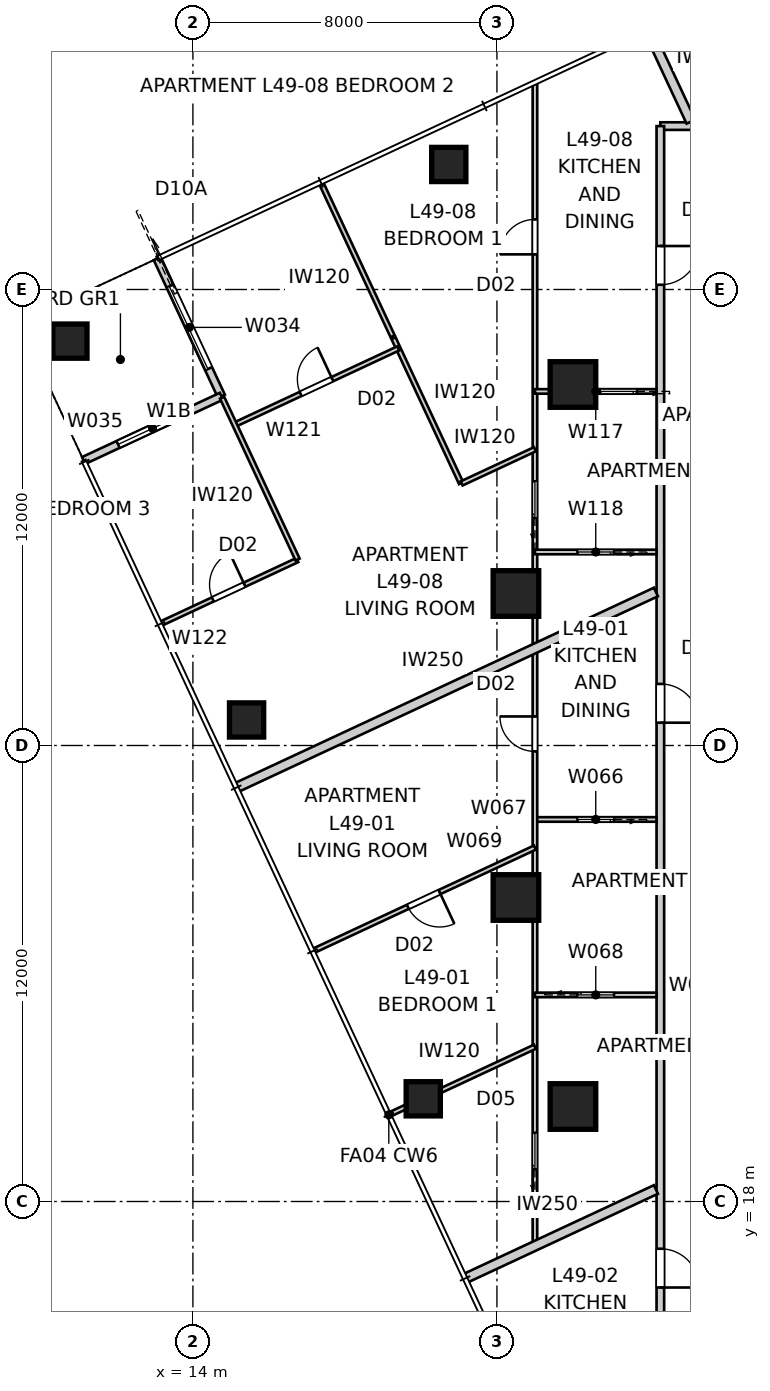
"""IFC4 building model, lengths in metres.
Left out: names, types, materials, properties, quantities, classifications, styles, units other than length and angle.
Written with IfcOpenShell. Run it as: python <this file> out.ifc"""

import sys

from ifc_helpers import new_model, si_unit, direction, frame, frame_2d, origin, origin_2d, place, context, subcontext, project, spatial, rectangle, extrude, element, fill, save


model = new_model("IFC4")
c1 = context("Model", 3, precision=1e-05, world=origin(), true_north=direction((0.0, 1.0)))
c2 = subcontext(c1, "Body", "Model", "MODEL_VIEW")
j1 = project(units=[si_unit("LENGTHUNIT", "METRE"), si_unit("PLANEANGLEUNIT", "RADIAN")], contexts=[c1])
p1 = place(None, origin())
s1 = spatial("IfcSite", under=j1, at=p1, CompositionType="ELEMENT")
p2 = place(p1, origin())
s2 = spatial("IfcBuilding", under=s1, at=p2, CompositionType="ELEMENT")
p3 = place(p2, frame((0.0, 0.0, 179.4)))
s3 = spatial("IfcBuildingStorey", under=s2, at=p3, CompositionType="ELEMENT", Elevation=179.4)
for number, where, z_axis, x_axis in (
    (1, (20.733, 45.29, 0.0), (0.0, 0.0, 1.0), (1.0, 0.0, 0.0)),
    (2, (10.764, 40.641, 0.0), (0.0, 0.0, 1.0), (1.0, 0.0, 0.0)),
    (3, (15.412, 30.672, 0.0), (0.0, 0.0, 1.0), (1.0, 0.0, 0.0)),
    (4, (20.061, 20.702, 0.0), (0.0, 0.0, 1.0), (1.0, 0.0, 0.0)),
):
    element("IfcColumn", number, at=place(p3, frame(where, z_axis=z_axis, x_axis=x_axis)), inside=s3, PredefinedType="COLUMN", context=c2, shape_type="SweptSolid", body=[
        extrude(rectangle(XDim=0.9, YDim=0.9, at=origin_2d()), origin(), (0.0, 0.0, 1.0), 3.4),
    ])
for number, where, z_axis, x_axis in (
    (5, (24.0, 39.5, 0.0), (0.0, 0.0, 1.0), (1.0, 0.0, 0.0)),
    (6, (22.5, 34.0, 0.0), (0.0, 0.0, 1.0), (1.0, 0.0, 0.0)),
    (7, (22.5, 26.0, 0.0), (0.0, 0.0, 1.0), (1.0, 0.0, 0.0)),
    (8, (24.0, 20.5, 0.0), (0.0, 0.0, 1.0), (1.0, 0.0, 0.0)),
):
    element("IfcColumn", number, at=place(p3, frame(where, z_axis=z_axis, x_axis=x_axis)), inside=s3, PredefinedType="COLUMN", context=c2, shape_type="SweptSolid", body=[
        extrude(rectangle(XDim=1.2, YDim=1.2, at=origin_2d()), origin(), (0.0, 0.0, 1.0), 3.4),
    ])
p4 = place(p3, frame((13.06, 42.815, 0.0), z_axis=(0.0, 0.0, 1.0), x_axis=(0.422658246362, -0.906289140828, 0.0)))
e9 = element("IfcWall", 9, at=p4, inside=s3, PredefinedType="SOLIDWALL", context=c2, shape_type="SweptSolid", body=[
    extrude(rectangle(XDim=4.0, YDim=0.2, at=frame_2d((2.0, 0.0))), origin(), (0.0, 0.0, 1.0), 3.25),
])
p5 = place(p4, frame((0.8, 0.0, 0.0)))
e10 = element("IfcOpeningElement", 10, at=p5, cuts=e9, PredefinedType="OPENING", context=c2, shape_type="SweptSolid", body=[
    extrude(rectangle(XDim=2.4, YDim=2.1, at=frame_2d((1.2, 1.05))), frame((0.0, 0.11, 0.0), z_axis=(0.0, -1.0, 0.0), x_axis=(1.0, 0.0, 0.0)), (0.0, 0.0, 1.0), 0.22),
])
p6 = place(p3, frame((14.75, 39.19, 0.0), z_axis=(0.0, 0.0, 1.0), x_axis=(-0.906289140828, -0.422658246362, 0.0)))
e11 = element("IfcWall", 11, at=p6, inside=s3, PredefinedType="SOLIDWALL", context=c2, shape_type="SweptSolid", body=[
    extrude(rectangle(XDim=4.0, YDim=0.2, at=frame_2d((2.0, 0.0))), origin(), (0.0, 0.0, 1.0), 3.25),
])
p7 = place(p6, frame((1.0, 0.0, 0.45)))
e12 = element("IfcOpeningElement", 12, at=p7, cuts=e11, PredefinedType="OPENING", context=c2, shape_type="SweptSolid", body=[
    extrude(rectangle(XDim=2.0, YDim=1.8, at=frame_2d((1.0, 0.9))), frame((0.0, 0.11, 0.0), z_axis=(0.0, -1.0, 0.0), x_axis=(1.0, 0.0, 0.0)), (0.0, 0.0, 1.0), 0.22),
])
p8 = place(p3, frame((30.758, 46.3, 0.0), z_axis=(0.0, 0.0, 1.0), x_axis=(-1.0, 0.0, 0.0)))
e13 = element("IfcWall", 13, at=p8, inside=s3, PredefinedType="PARTITIONING", context=c2, shape_type="SweptSolid", body=[
    extrude(rectangle(XDim=4.458, YDim=0.2, at=frame_2d((2.229, 0.0))), origin(), (0.0, 0.0, 1.0), 3.25),
])
p9 = place(p3, frame((26.3, 46.3, 0.0), z_axis=(0.0, 0.0, 1.0), x_axis=(0.0, -1.0, 0.0)))
e14 = element("IfcWall", 14, at=p9, inside=s3, PredefinedType="PARTITIONING", context=c2, shape_type="SweptSolid", body=[
    extrude(rectangle(XDim=32.6, YDim=0.2, at=frame_2d((16.3, 0.0))), origin(), (0.0, 0.0, 1.0), 3.25),
])
p10 = place(p9, frame((3.156, 0.0, 0.0)))
e15 = element("IfcOpeningElement", 15, at=p10, cuts=e14, PredefinedType="OPENING", context=c2, shape_type="SweptSolid", body=[
    extrude(rectangle(XDim=1.02, YDim=2.1, at=frame_2d((0.51, 1.05))), frame((0.0, 0.11, 0.0), z_axis=(0.0, -1.0, 0.0), x_axis=(1.0, 0.0, 0.0)), (0.0, 0.0, 1.0), 0.22),
])
p11 = place(p9, frame((14.68, 0.0, 0.0)))
e16 = element("IfcOpeningElement", 16, at=p11, cuts=e14, PredefinedType="OPENING", context=c2, shape_type="SweptSolid", body=[
    extrude(rectangle(XDim=1.02, YDim=2.34, at=frame_2d((0.51, 1.17))), frame((0.0, 0.11, 0.0), z_axis=(0.0, -1.0, 0.0), x_axis=(1.0, 0.0, 0.0)), (0.0, 0.0, 1.0), 0.22),
])
p12 = place(p9, frame((29.543, 0.0, 0.0)))
e17 = element("IfcOpeningElement", 17, at=p12, cuts=e14, PredefinedType="OPENING", context=c2, shape_type="SweptSolid", body=[
    extrude(rectangle(XDim=1.02, YDim=2.34, at=frame_2d((0.51, 1.17))), frame((0.0, 0.11, 0.0), z_axis=(0.0, -1.0, 0.0), x_axis=(1.0, 0.0, 0.0)), (0.0, 0.0, 1.0), 0.22),
])
p13 = place(p3, frame((25.975, 48.838, 0.0), z_axis=(0.0, 0.0, 1.0), x_axis=(0.422590257842, -0.906320844943, 0.0)))
e18 = element("IfcWall", 18, at=p13, inside=s3, PredefinedType="PARTITIONING", context=c2, shape_type="SweptSolid", body=[
    extrude(rectangle(XDim=2.671, YDim=0.25, at=frame_2d((1.336, 0.0))), origin(), (0.0, 0.0, 1.0), 3.25),
])
p14 = place(p3, frame((15.14, 28.89, 0.0), z_axis=(0.0, 0.0, 1.0), x_axis=(0.906303906082, 0.422626584374, 0.0)))
e19 = element("IfcWall", 19, at=p14, inside=s3, PredefinedType="PARTITIONING", context=c2, shape_type="SweptSolid", body=[
    extrude(rectangle(XDim=12.185, YDim=0.25, at=frame_2d((6.092, 0.0))), origin(), (0.0, 0.0, 1.0), 3.25),
])
p15 = place(p3, frame((21.162, 15.975, 0.0), z_axis=(0.0, 0.0, 1.0), x_axis=(0.906309193024, 0.422615246577, 0.0)))
e20 = element("IfcWall", 20, at=p15, inside=s3, PredefinedType="PARTITIONING", context=c2, shape_type="SweptSolid", body=[
    extrude(rectangle(XDim=5.54, YDim=0.25, at=frame_2d((2.77, 0.0))), origin(), (0.0, 0.0, 1.0), 3.25),
])
p16 = place(p3, frame((26.2, 28.054, 0.0), z_axis=(0.0, 0.0, 1.0), x_axis=(-1.0, 0.0, 0.0)))
e21 = element("IfcWall", 21, at=p16, inside=s3, PredefinedType="PARTITIONING", context=c2, shape_type="SweptSolid", body=[
    extrude(rectangle(XDim=3.2, YDim=0.12, at=frame_2d((1.6, 0.0))), origin(), (0.0, 0.0, 1.0), 3.25),
])
p17 = place(p16, frame((1.12, 0.0, 0.0)))
e22 = element("IfcOpeningElement", 22, at=p17, cuts=e21, PredefinedType="OPENING", context=c2, shape_type="SweptSolid", body=[
    extrude(rectangle(XDim=0.96, YDim=2.1, at=frame_2d((0.48, 1.05))), frame((0.0, 0.07, 0.0), z_axis=(0.0, -1.0, 0.0), x_axis=(1.0, 0.0, 0.0)), (0.0, 0.0, 1.0), 0.14),
])
p18 = place(p3, frame((23.0, 16.832, 0.0), z_axis=(0.0, 0.0, 1.0), x_axis=(0.0, 1.0, 0.0)))
e23 = element("IfcWall", 23, at=p18, inside=s3, PredefinedType="PARTITIONING", context=c2, shape_type="SweptSolid", body=[
    extrude(rectangle(XDim=30.574, YDim=0.12, at=frame_2d((15.287, 0.0))), origin(), (0.0, 0.0, 1.0), 2.55),
])
p19 = place(p18, frame((26.093, 0.0, 0.0)))
e24 = element("IfcOpeningElement", 24, at=p19, cuts=e23, PredefinedType="OPENING", context=c2, shape_type="SweptSolid", body=[
    extrude(rectangle(XDim=0.92, YDim=2.34, at=frame_2d((0.46, 1.17))), frame((0.0, 0.07, 0.0), z_axis=(0.0, -1.0, 0.0), x_axis=(1.0, 0.0, 0.0)), (0.0, 0.0, 1.0), 0.14),
])
p20 = place(p18, frame((13.012, 0.0, 0.0)))
e25 = element("IfcOpeningElement", 25, at=p20, cuts=e23, PredefinedType="OPENING", context=c2, shape_type="SweptSolid", body=[
    extrude(rectangle(XDim=0.92, YDim=2.34, at=frame_2d((0.46, 1.17))), frame((0.0, 0.07, 0.0), z_axis=(0.0, -1.0, 0.0), x_axis=(1.0, 0.0, 0.0)), (0.0, 0.0, 1.0), 0.14),
])
p21 = place(p18, frame((19.16, 0.0, 0.0)))
e26 = element("IfcOpeningElement", 26, at=p21, cuts=e23, PredefinedType="OPENING", context=c2, shape_type="SweptSolid", body=[
    extrude(rectangle(XDim=0.96, YDim=2.1, at=frame_2d((0.48, 1.05))), frame((0.0, 0.07, 0.0), z_axis=(0.0, -1.0, 0.0), x_axis=(1.0, 0.0, 0.0)), (0.0, 0.0, 1.0), 0.14),
])
p22 = place(p18, frame((2.018, 0.0, 0.0)))
e27 = element("IfcOpeningElement", 27, at=p22, cuts=e23, PredefinedType="OPENING", context=c2, shape_type="SweptSolid", body=[
    extrude(rectangle(XDim=0.96, YDim=2.1, at=frame_2d((0.48, 1.05))), frame((0.0, 0.07, 0.0), z_axis=(0.0, -1.0, 0.0), x_axis=(1.0, 0.0, 0.0)), (0.0, 0.0, 1.0), 0.14),
])
p23 = place(p3, frame((23.0, 23.436, 0.0), z_axis=(0.0, 0.0, 1.0), x_axis=(1.0, 0.0, 0.0)))
e28 = element("IfcWall", 28, at=p23, inside=s3, PredefinedType="PARTITIONING", context=c2, shape_type="SweptSolid", body=[
    extrude(rectangle(XDim=3.2, YDim=0.12, at=frame_2d((1.6, 0.0))), origin(), (0.0, 0.0, 1.0), 3.25),
])
p24 = place(p23, frame((1.12, 0.0, 0.0)))
e29 = element("IfcOpeningElement", 29, at=p24, cuts=e28, PredefinedType="OPENING", context=c2, shape_type="SweptSolid", body=[
    extrude(rectangle(XDim=0.96, YDim=2.1, at=frame_2d((0.48, 1.05))), frame((0.0, 0.07, 0.0), z_axis=(0.0, -1.0, 0.0), x_axis=(1.0, 0.0, 0.0)), (0.0, 0.0, 1.0), 0.14),
])
p25 = place(p3, frame((23.0, 27.314, 0.0), z_axis=(0.0, 0.0, 1.0), x_axis=(-0.906305562553, -0.422623032129, 0.0)))
e30 = element("IfcWall", 30, at=p25, inside=s3, PredefinedType="PARTITIONING", context=c2, shape_type="SweptSolid", body=[
    extrude(rectangle(XDim=6.417, YDim=0.12, at=frame_2d((3.209, 0.0))), origin(), (0.0, 0.0, 1.0), 3.25),
])
p26 = place(p25, frame((2.769, 0.0, 0.0)))
e31 = element("IfcOpeningElement", 31, at=p26, cuts=e30, PredefinedType="OPENING", context=c2, shape_type="SweptSolid", body=[
    extrude(rectangle(XDim=0.92, YDim=2.34, at=frame_2d((0.46, 1.17))), frame((0.0, 0.07, 0.0), z_axis=(0.0, -1.0, 0.0), x_axis=(1.0, 0.0, 0.0)), (0.0, 0.0, 1.0), 0.14),
])
p27 = place(p3, frame((23.0, 22.073, 0.0), z_axis=(0.0, 0.0, 1.0), x_axis=(-0.906304800396, -0.422624666552, 0.0)))
e32 = element("IfcWall", 32, at=p27, inside=s3, PredefinedType="PARTITIONING", context=c2, shape_type="SweptSolid", body=[
    extrude(rectangle(XDim=4.203, YDim=0.12, at=frame_2d((2.101, 0.0))), origin(), (0.0, 0.0, 1.0), 3.25),
])
p28 = place(p3, frame((26.2, 39.318, 0.0), z_axis=(0.0, 0.0, 1.0), x_axis=(-1.0, 0.0, 0.0)))
e33 = element("IfcWall", 33, at=p28, inside=s3, PredefinedType="PARTITIONING", context=c2, shape_type="SweptSolid", body=[
    extrude(rectangle(XDim=3.2, YDim=0.12, at=frame_2d((1.6, 0.0))), origin(), (0.0, 0.0, 1.0), 3.25),
])
p29 = place(p28, frame((0.52, 0.0, 0.0)))
e34 = element("IfcOpeningElement", 34, at=p29, cuts=e33, PredefinedType="OPENING", context=c2, shape_type="SweptSolid", body=[
    extrude(rectangle(XDim=0.96, YDim=2.1, at=frame_2d((0.48, 1.05))), frame((0.0, 0.07, 0.0), z_axis=(0.0, -1.0, 0.0), x_axis=(1.0, 0.0, 0.0)), (0.0, 0.0, 1.0), 0.14),
])
p30 = place(p3, frame((26.2, 35.092, 0.0), z_axis=(0.0, 0.0, 1.0), x_axis=(-1.0, 0.0, 0.0)))
e35 = element("IfcWall", 35, at=p30, inside=s3, PredefinedType="PARTITIONING", context=c2, shape_type="SweptSolid", body=[
    extrude(rectangle(XDim=3.2, YDim=0.12, at=frame_2d((1.6, 0.0))), origin(), (0.0, 0.0, 1.0), 3.25),
])
p31 = place(p30, frame((1.12, 0.0, 0.0)))
e36 = element("IfcOpeningElement", 36, at=p31, cuts=e35, PredefinedType="OPENING", context=c2, shape_type="SweptSolid", body=[
    extrude(rectangle(XDim=0.96, YDim=2.1, at=frame_2d((0.48, 1.05))), frame((0.0, 0.07, 0.0), z_axis=(0.0, -1.0, 0.0), x_axis=(1.0, 0.0, 0.0)), (0.0, 0.0, 1.0), 0.14),
])
p32 = place(p3, frame((19.279, 40.718, 0.0), z_axis=(0.0, 0.0, 1.0), x_axis=(0.422625167194, -0.906304566939, 0.0)))
e37 = element("IfcWall", 37, at=p32, inside=s3, PredefinedType="PARTITIONING", context=c2, shape_type="SweptSolid", body=[
    extrude(rectangle(XDim=4.211, YDim=0.12, at=frame_2d((2.105, 0.0))), origin(), (0.0, 0.0, 1.0), 3.25),
])
p33 = place(p3, frame((21.072, 36.897, 0.0), z_axis=(0.0, 0.0, 1.0), x_axis=(0.90630329877, 0.422627886727, 0.0)))
e38 = element("IfcWall", 38, at=p33, inside=s3, PredefinedType="PARTITIONING", context=c2, shape_type="SweptSolid", body=[
    extrude(rectangle(XDim=2.128, YDim=0.12, at=frame_2d((1.064, 0.0))), origin(), (0.0, 0.0, 1.0), 3.25),
])
p34 = place(p3, frame((15.099, 38.442, 0.0), z_axis=(0.0, 0.0, 1.0), x_axis=(0.906306539388, 0.422620937321, 0.0)))
e39 = element("IfcWall", 39, at=p34, inside=s3, PredefinedType="PARTITIONING", context=c2, shape_type="SweptSolid", body=[
    extrude(rectangle(XDim=4.75, YDim=0.12, at=frame_2d((2.375, 0.0))), origin(), (0.0, 0.0, 1.0), 3.25),
])
p35 = place(p34, frame((1.915, 0.0, 0.0)))
e40 = element("IfcOpeningElement", 40, at=p35, cuts=e39, PredefinedType="OPENING", context=c2, shape_type="SweptSolid", body=[
    extrude(rectangle(XDim=0.92, YDim=2.34, at=frame_2d((0.46, 1.17))), frame((0.0, 0.07, 0.0), z_axis=(0.0, -1.0, 0.0), x_axis=(1.0, 0.0, 0.0)), (0.0, 0.0, 1.0), 0.14),
])
p36 = place(p3, frame((13.169, 33.211, 0.0), z_axis=(0.0, 0.0, 1.0), x_axis=(0.9062952203, 0.422645210149, 0.0)))
e41 = element("IfcWall", 41, at=p36, inside=s3, PredefinedType="PARTITIONING", context=c2, shape_type="SweptSolid", body=[
    extrude(rectangle(XDim=3.95, YDim=0.12, at=frame_2d((1.975, 0.0))), origin(), (0.0, 0.0, 1.0), 3.25),
])
p37 = place(p36, frame((1.495, 0.0, 0.0)))
e42 = element("IfcOpeningElement", 42, at=p37, cuts=e41, PredefinedType="OPENING", context=c2, shape_type="SweptSolid", body=[
    extrude(rectangle(XDim=0.92, YDim=2.34, at=frame_2d((0.46, 1.17))), frame((0.0, 0.07, 0.0), z_axis=(0.0, -1.0, 0.0), x_axis=(1.0, 0.0, 0.0)), (0.0, 0.0, 1.0), 0.14),
])
p38 = place(p3, frame((16.754, 34.894, 0.0), z_axis=(0.0, 0.0, 1.0), x_axis=(-0.42256979057, 0.906330387937, 0.0)))
e43 = element("IfcWall", 43, at=p38, inside=s3, PredefinedType="PARTITIONING", context=c2, shape_type="SweptSolid", body=[
    extrude(rectangle(XDim=4.7, YDim=0.12, at=frame_2d((2.35, 0.0))), origin(), (0.0, 0.0, 1.0), 3.25),
])
p39 = place(p3, frame((19.256, 40.767, 0.0), z_axis=(0.0, 0.0, 1.0), x_axis=(-0.42260518136, 0.906313886403, 0.0)))
e44 = element("IfcWall", 44, at=p39, inside=s3, PredefinedType="PARTITIONING", context=c2, shape_type="SweptSolid", body=[
    extrude(rectangle(XDim=4.435, YDim=0.12, at=frame_2d((2.218, 0.0))), origin(), (0.0, 0.0, 1.0), 3.25),
])
p40 = place(p5, origin())
e45 = element("IfcDoor", 45, at=p40, inside=s3, OperationType="SLIDING_TO_LEFT", PredefinedType="DOOR", context=c2, shape_type="SweptSolid", body=[
    extrude(rectangle(XDim=2.4, YDim=2.1, at=frame_2d((1.2, 1.05))), frame((0.0, 0.025, 0.0), z_axis=(0.0, -1.0, 0.0), x_axis=(1.0, 0.0, 0.0)), (0.0, 0.0, 1.0), 0.05),
])
fill(e10, e45)
p41 = place(p7, origin())
e46 = element("IfcWindow", 46, at=p41, inside=s3, PartitioningType="SINGLE_PANEL", PredefinedType="WINDOW", context=c2, shape_type="SweptSolid", body=[
    extrude(rectangle(XDim=2.0, YDim=1.8, at=frame_2d((1.0, 0.9))), frame((0.0, 0.03, 0.0), z_axis=(0.0, -1.0, 0.0), x_axis=(1.0, 0.0, 0.0)), (0.0, 0.0, 1.0), 0.06),
])
fill(e12, e46)
p42 = place(p10, origin())
e47 = element("IfcDoor", 47, at=p42, inside=s3, OperationType="SINGLE_SWING_LEFT", PredefinedType="DOOR", context=c2, shape_type="SweptSolid", body=[
    extrude(rectangle(XDim=1.02, YDim=2.1, at=frame_2d((0.51, 1.05))), frame((0.0, 0.025, 0.0), z_axis=(0.0, -1.0, 0.0), x_axis=(1.0, 0.0, 0.0)), (0.0, 0.0, 1.0), 0.05),
])
fill(e15, e47)
p43 = place(p11, origin())
e48 = element("IfcDoor", 48, at=p43, inside=s3, OperationType="SINGLE_SWING_RIGHT", PredefinedType="DOOR", context=c2, shape_type="SweptSolid", body=[
    extrude(rectangle(XDim=1.02, YDim=2.34, at=frame_2d((0.51, 1.17))), frame((0.0, 0.025, 0.0), z_axis=(0.0, -1.0, 0.0), x_axis=(1.0, 0.0, 0.0)), (0.0, 0.0, 1.0), 0.05),
])
fill(e16, e48)
p44 = place(p12, origin())
e49 = element("IfcDoor", 49, at=p44, inside=s3, OperationType="SINGLE_SWING_RIGHT", PredefinedType="DOOR", context=c2, shape_type="SweptSolid", body=[
    extrude(rectangle(XDim=1.02, YDim=2.34, at=frame_2d((0.51, 1.17))), frame((0.0, 0.025, 0.0), z_axis=(0.0, -1.0, 0.0), x_axis=(1.0, 0.0, 0.0)), (0.0, 0.0, 1.0), 0.05),
])
fill(e17, e49)
p45 = place(p19, origin())
e50 = element("IfcDoor", 50, at=p45, inside=s3, OperationType="SINGLE_SWING_LEFT", PredefinedType="DOOR", context=c2, shape_type="SweptSolid", body=[
    extrude(rectangle(XDim=0.92, YDim=2.34, at=frame_2d((0.46, 1.17))), frame((0.0, 0.025, 0.0), z_axis=(0.0, -1.0, 0.0), x_axis=(1.0, 0.0, 0.0)), (0.0, 0.0, 1.0), 0.05),
])
fill(e24, e50)
p46 = place(p29, origin())
e51 = element("IfcDoor", 51, at=p46, inside=s3, OperationType="SLIDING_TO_LEFT", PredefinedType="DOOR", context=c2, shape_type="SweptSolid", body=[
    extrude(rectangle(XDim=0.96, YDim=2.1, at=frame_2d((0.48, 1.05))), frame((0.0, 0.025, 0.0), z_axis=(0.0, -1.0, 0.0), x_axis=(1.0, 0.0, 0.0)), (0.0, 0.0, 1.0), 0.05),
])
fill(e34, e51)
p47 = place(p20, origin())
e52 = element("IfcDoor", 52, at=p47, inside=s3, OperationType="SINGLE_SWING_RIGHT", PredefinedType="DOOR", context=c2, shape_type="SweptSolid", body=[
    extrude(rectangle(XDim=0.92, YDim=2.34, at=frame_2d((0.46, 1.17))), frame((0.0, 0.025, 0.0), z_axis=(0.0, -1.0, 0.0), x_axis=(1.0, 0.0, 0.0)), (0.0, 0.0, 1.0), 0.05),
])
fill(e25, e52)
p48 = place(p17, origin())
e53 = element("IfcDoor", 53, at=p48, inside=s3, OperationType="SLIDING_TO_LEFT", PredefinedType="DOOR", context=c2, shape_type="SweptSolid", body=[
    extrude(rectangle(XDim=0.96, YDim=2.1, at=frame_2d((0.48, 1.05))), frame((0.0, 0.025, 0.0), z_axis=(0.0, -1.0, 0.0), x_axis=(1.0, 0.0, 0.0)), (0.0, 0.0, 1.0), 0.05),
])
fill(e22, e53)
p49 = place(p31, origin())
e54 = element("IfcDoor", 54, at=p49, inside=s3, OperationType="SLIDING_TO_LEFT", PredefinedType="DOOR", context=c2, shape_type="SweptSolid", body=[
    extrude(rectangle(XDim=0.96, YDim=2.1, at=frame_2d((0.48, 1.05))), frame((0.0, 0.025, 0.0), z_axis=(0.0, -1.0, 0.0), x_axis=(1.0, 0.0, 0.0)), (0.0, 0.0, 1.0), 0.05),
])
fill(e36, e54)
p50 = place(p21, origin())
e55 = element("IfcDoor", 55, at=p50, inside=s3, OperationType="SLIDING_TO_LEFT", PredefinedType="DOOR", context=c2, shape_type="SweptSolid", body=[
    extrude(rectangle(XDim=0.96, YDim=2.1, at=frame_2d((0.48, 1.05))), frame((0.0, 0.025, 0.0), z_axis=(0.0, -1.0, 0.0), x_axis=(1.0, 0.0, 0.0)), (0.0, 0.0, 1.0), 0.05),
])
fill(e26, e55)
p51 = place(p26, origin())
e56 = element("IfcDoor", 56, at=p51, inside=s3, OperationType="SINGLE_SWING_LEFT", PredefinedType="DOOR", context=c2, shape_type="SweptSolid", body=[
    extrude(rectangle(XDim=0.92, YDim=2.34, at=frame_2d((0.46, 1.17))), frame((0.0, 0.025, 0.0), z_axis=(0.0, -1.0, 0.0), x_axis=(1.0, 0.0, 0.0)), (0.0, 0.0, 1.0), 0.05),
])
fill(e31, e56)
p52 = place(p24, origin())
e57 = element("IfcDoor", 57, at=p52, inside=s3, OperationType="SLIDING_TO_LEFT", PredefinedType="DOOR", context=c2, shape_type="SweptSolid", body=[
    extrude(rectangle(XDim=0.96, YDim=2.1, at=frame_2d((0.48, 1.05))), frame((0.0, 0.025, 0.0), z_axis=(0.0, -1.0, 0.0), x_axis=(1.0, 0.0, 0.0)), (0.0, 0.0, 1.0), 0.05),
])
fill(e29, e57)
p53 = place(p35, origin())
e58 = element("IfcDoor", 58, at=p53, inside=s3, OperationType="SINGLE_SWING_RIGHT", PredefinedType="DOOR", context=c2, shape_type="SweptSolid", body=[
    extrude(rectangle(XDim=0.92, YDim=2.34, at=frame_2d((0.46, 1.17))), frame((0.0, 0.025, 0.0), z_axis=(0.0, -1.0, 0.0), x_axis=(1.0, 0.0, 0.0)), (0.0, 0.0, 1.0), 0.05),
])
fill(e40, e58)
p54 = place(p37, origin())
e59 = element("IfcDoor", 59, at=p54, inside=s3, OperationType="SINGLE_SWING_RIGHT", PredefinedType="DOOR", context=c2, shape_type="SweptSolid", body=[
    extrude(rectangle(XDim=0.92, YDim=2.34, at=frame_2d((0.46, 1.17))), frame((0.0, 0.025, 0.0), z_axis=(0.0, -1.0, 0.0), x_axis=(1.0, 0.0, 0.0)), (0.0, 0.0, 1.0), 0.05),
])
fill(e42, e59)
p55 = place(p22, origin())
e60 = element("IfcDoor", 60, at=p55, inside=s3, OperationType="SLIDING_TO_LEFT", PredefinedType="DOOR", context=c2, shape_type="SweptSolid", body=[
    extrude(rectangle(XDim=0.96, YDim=2.1, at=frame_2d((0.48, 1.05))), frame((0.0, 0.025, 0.0), z_axis=(0.0, -1.0, 0.0), x_axis=(1.0, 0.0, 0.0)), (0.0, 0.0, 1.0), 0.05),
])
fill(e27, e60)
save(model, sys.argv[1])
